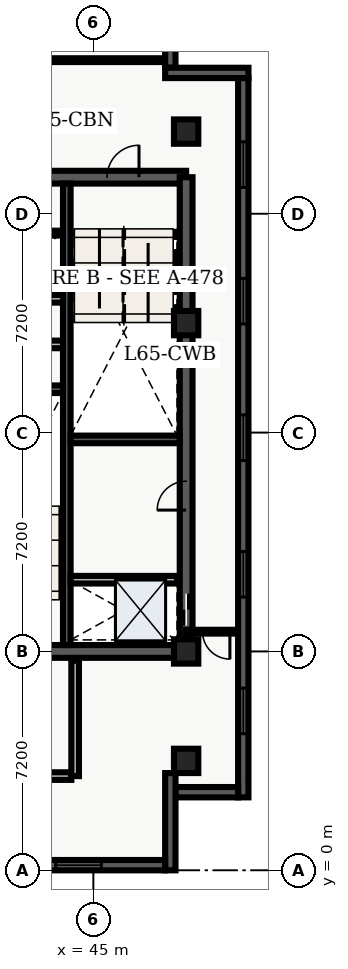
"""IFC4 building model, lengths in metres.
Left out: names, types, materials, properties, quantities, classifications, styles, units other than length and angle.
Written with IfcOpenShell. Run it as: python <this file> out.ifc"""

import sys

from ifc_helpers import new_model, entity, si_unit, converted_unit, direction, frame, origin_with_axes, origin_2d_with_axis, place, context, subcontext, project, spatial, polyline, rectangle, outline, extrude, element, fill, save


model = new_model("IFC4")
c1 = context("Model", 3, precision=1e-05, world=origin_with_axes(), true_north=direction((0.0, 1.0)))
c2 = subcontext(c1, "Body", "Model", "MODEL_VIEW")
j1 = project(units=[si_unit("LENGTHUNIT", "METRE"), converted_unit("PLANEANGLEUNIT", "DEGREE", entity("IfcPlaneAngleMeasure", 0.017), si_unit("PLANEANGLEUNIT", "RADIAN"), dimensions=[0, 0, 0, 0, 0, 0, 0])], contexts=[c1])
p1 = place(None, origin_with_axes())
s1 = spatial("IfcSite", under=j1, at=p1, CompositionType="ELEMENT")
p2 = place(p1, origin_with_axes())
s2 = spatial("IfcBuilding", under=s1, at=p2, CompositionType="ELEMENT")
p3 = place(p2, frame((0.0, 0.0, 264.6), z_axis=(0.0, 0.0, 1.0), x_axis=(1.0, 0.0, 0.0)))
s3 = spatial("IfcBuildingStorey", under=s2, at=p3, CompositionType="ELEMENT", Elevation=264.6)
p4 = place(p3, frame((40.2, 7.2, 0.0), z_axis=(0.0, 0.0, 1.0), x_axis=(1.0, 0.0, 0.0)))
e1 = element("IfcWall", 1, at=p4, inside=s3, PredefinedType="SHEAR", context=c2, shape_type="SweptSolid", body=[
    extrude(outline(polyline([(0.0, -0.21), (7.85, -0.21), (7.85, 0.21), (0.0, 0.21), (0.0, -0.21)])), origin_with_axes(), (0.0, 0.0, 1.0), 3.66),
])
p5 = place(p4, frame((2.175, 0.0, 0.0), z_axis=(0.0, 0.0, 1.0), x_axis=(1.0, 0.0, 0.0)))
e2 = element("IfcOpeningElement", 2, at=p5, cuts=e1, PredefinedType="OPENING", context=c2, shape_type="SweptSolid", body=[
    extrude(rectangle(XDim=1.05, YDim=0.44, at=origin_2d_with_axis()), origin_with_axes(), (0.0, 0.0, 1.0), 2.15),
])
p6 = place(p3, frame((40.2, 22.8, 0.0), z_axis=(0.0, 0.0, 1.0), x_axis=(1.0, 0.0, 0.0)))
e3 = element("IfcWall", 3, at=p6, inside=s3, PredefinedType="SHEAR", context=c2, shape_type="SweptSolid", body=[
    extrude(outline(polyline([(0.0, -0.21), (7.85, -0.21), (7.85, 0.21), (0.0, 0.21), (0.0, -0.21)])), origin_with_axes(), (0.0, 0.0, 1.0), 3.66),
])
p7 = place(p6, frame((5.775, 0.0, 0.0), z_axis=(0.0, 0.0, 1.0), x_axis=(1.0, 0.0, 0.0)))
e4 = element("IfcOpeningElement", 4, at=p7, cuts=e3, PredefinedType="OPENING", context=c2, shape_type="SweptSolid", body=[
    extrude(rectangle(XDim=1.05, YDim=0.44, at=origin_2d_with_axis()), origin_with_axes(), (0.0, 0.0, 1.0), 2.15),
])
p8 = place(p6, frame((2.15, 0.0, 0.0), z_axis=(0.0, 0.0, 1.0), x_axis=(1.0, 0.0, 0.0)))
e5 = element("IfcOpeningElement", 5, at=p8, cuts=e3, PredefinedType="OPENING", context=c2, shape_type="SweptSolid", body=[
    extrude(rectangle(XDim=0.9, YDim=0.44, at=origin_2d_with_axis()), origin_with_axes(), (0.0, 0.0, 1.0), 2.15),
])
p9 = place(p3, frame((48.05, 7.2, 0.0), z_axis=(0.0, 0.0, 1.0), x_axis=(0.0, 1.0, 0.0)))
e6 = element("IfcWall", 6, at=p9, inside=s3, PredefinedType="SHEAR", context=c2, shape_type="SweptSolid", body=[
    extrude(outline(polyline([(0.0, -0.21), (15.6, -0.21), (15.6, 0.21), (0.0, 0.21), (0.0, -0.21)])), origin_with_axes(), (0.0, 0.0, 1.0), 3.66),
])
p10 = place(p9, frame((1.375, 0.0, 0.0), z_axis=(0.0, 0.0, 1.0), x_axis=(1.0, 0.0, 0.0)))
e7 = element("IfcOpeningElement", 7, at=p10, cuts=e6, PredefinedType="OPENING", context=c2, shape_type="SweptSolid", body=[
    extrude(rectangle(XDim=1.05, YDim=0.44, at=origin_2d_with_axis()), origin_with_axes(), (0.0, 0.0, 1.0), 2.15),
])
p11 = place(p9, frame((5.125, 0.0, 0.0), z_axis=(0.0, 0.0, 1.0), x_axis=(1.0, 0.0, 0.0)))
e8 = element("IfcOpeningElement", 8, at=p11, cuts=e6, PredefinedType="OPENING", context=c2, shape_type="SweptSolid", body=[
    extrude(rectangle(XDim=0.95, YDim=0.44, at=origin_2d_with_axis()), origin_with_axes(), (0.0, 0.0, 1.0), 2.15),
])
p12 = place(p3, frame((44.125, 7.41, 0.0), z_axis=(0.0, 0.0, 1.0), x_axis=(0.0, 1.0, 0.0)))
e9 = element("IfcWall", 9, at=p12, inside=s3, PredefinedType="SHEAR", context=c2, shape_type="SweptSolid", body=[
    extrude(outline(polyline([(0.0, -0.125), (15.18, -0.125), (15.18, 0.125), (0.0, 0.125), (0.0, -0.125)])), origin_with_axes(), (0.0, 0.0, 1.0), 3.66),
])
for number, where, z_axis, x_axis in (
    (10, (40.41, 15.825, 0.0), (0.0, 0.0, 1.0), (1.0, 0.0, 0.0)),
    (11, (44.25, 14.175, 0.0), (0.0, 0.0, 1.0), (1.0, 0.0, 0.0)),
):
    element("IfcWall", number, at=place(p3, frame(where, z_axis=z_axis, x_axis=x_axis)), inside=s3, PredefinedType="SHEAR", context=c2, shape_type="SweptSolid", body=[
        extrude(outline(polyline([(0.0, -0.125), (3.59, -0.125), (3.59, 0.125), (0.0, 0.125), (0.0, -0.125)])), origin_with_axes(), (0.0, 0.0, 1.0), 3.66),
    ])
p13 = place(p3, frame((40.5, 17.3, 0.0), z_axis=(0.0, 0.0, 1.0), x_axis=(1.0, 0.0, 0.0)))
e12 = element("IfcWall", 12, at=p13, inside=s3, PredefinedType="SOLIDWALL", context=c2, shape_type="SweptSolid", body=[
    extrude(outline(polyline([(0.0, -0.125), (3.5, -0.125), (3.5, 0.125), (0.0, 0.125), (0.0, -0.125)])), origin_with_axes(), (0.0, 0.0, 1.0), 2.7),
])
p14 = place(p13, frame((2.4, 0.0, 0.0), z_axis=(0.0, 0.0, 1.0), x_axis=(1.0, 0.0, 0.0)))
e13 = element("IfcOpeningElement", 13, at=p14, cuts=e12, PredefinedType="OPENING", context=c2, shape_type="SweptSolid", body=[
    extrude(rectangle(XDim=0.9, YDim=0.27, at=origin_2d_with_axis()), origin_with_axes(), (0.0, 0.0, 1.0), 2.15),
])
p15 = place(p3, frame((40.5, 18.8, 0.0), z_axis=(0.0, 0.0, 1.0), x_axis=(1.0, 0.0, 0.0)))
e14 = element("IfcWall", 14, at=p15, inside=s3, PredefinedType="SOLIDWALL", context=c2, shape_type="SweptSolid", body=[
    extrude(outline(polyline([(0.0, -0.125), (3.5, -0.125), (3.5, 0.125), (0.0, 0.125), (0.0, -0.125)])), origin_with_axes(), (0.0, 0.0, 1.0), 2.7),
])
p16 = place(p3, frame((40.325, 3.1, 0.0), z_axis=(0.0, 0.0, 1.0), x_axis=(1.0, 0.0, 0.0)))
e15 = element("IfcWall", 15, at=p16, inside=s3, PredefinedType="SOLIDWALL", context=c2, shape_type="SweptSolid", body=[
    extrude(outline(polyline([(0.0, -0.125), (3.95, -0.125), (3.95, 0.125), (0.0, 0.125), (0.0, -0.125)])), origin_with_axes(), (0.0, 0.0, 1.0), 2.7),
])
p17 = place(p3, frame((44.4, 3.1, 0.0), z_axis=(0.0, 0.0, 1.0), x_axis=(0.0, 1.0, 0.0)))
e16 = element("IfcWall", 16, at=p17, inside=s3, PredefinedType="SOLIDWALL", context=c2, shape_type="SweptSolid", body=[
    extrude(outline(polyline([(0.0, -0.125), (3.8, -0.125), (3.8, 0.125), (0.0, 0.125), (0.0, -0.125)])), origin_with_axes(), (0.0, 0.0, 1.0), 2.7),
])
for number, where, z_axis, x_axis in (
    (17, (48.05, 3.6, 0.0), (0.0, 0.0, 1.0), (1.0, 0.0, 0.0)),
    (18, (48.05, 7.2, 0.0), (0.0, 0.0, 1.0), (1.0, 0.0, 0.0)),
    (19, (48.05, 18.0, 0.0), (0.0, 0.0, 1.0), (1.0, 0.0, 0.0)),
    (20, (48.05, 24.3, 0.0), (0.0, 0.0, 1.0), (1.0, 0.0, 0.0)),
):
    element("IfcColumn", number, at=place(p3, frame(where, z_axis=z_axis, x_axis=x_axis)), inside=s3, PredefinedType="COLUMN", context=c2, shape_type="SweptSolid", body=[
        extrude(rectangle(XDim=0.8, YDim=0.8, at=origin_2d_with_axis()), origin_with_axes(), (0.0, 0.0, 1.0), 3.9),
    ])
p18 = place(p3, frame((40.5, 20.96, 0.0), z_axis=(0.0, 0.0, 1.0), x_axis=(1.0, 0.0, 0.0)))
e21 = element("IfcWall", 21, at=p18, inside=s3, PredefinedType="PARTITIONING", context=c2, shape_type="SweptSolid", body=[
    extrude(outline(polyline([(0.0, -0.08), (3.5, -0.08), (3.5, 0.08), (0.0, 0.08), (0.0, -0.08)])), origin_with_axes(), (0.0, 0.0, 1.0), 2.7),
])
p19 = place(p3, frame((44.25, 9.56, 0.0), z_axis=(0.0, 0.0, 1.0), x_axis=(1.0, 0.0, 0.0)))
e22 = element("IfcWall", 22, at=p19, inside=s3, PredefinedType="SOLIDWALL", context=c2, shape_type="SweptSolid", body=[
    extrude(outline(polyline([(0.0, -0.125), (3.5, -0.125), (3.5, 0.125), (0.0, 0.125), (0.0, -0.125)])), origin_with_axes(), (0.0, 0.0, 1.0), 2.7),
])
p20 = place(p3, frame((49.765, 7.85, 0.0), z_axis=(0.0, 0.0, 1.0), x_axis=(-1.0, 0.0, 0.0)))
e23 = element("IfcWall", 23, at=p20, inside=s3, PredefinedType="PARTITIONING", context=c2, shape_type="SweptSolid", body=[
    extrude(outline(polyline([(0.0, -0.062), (1.715, -0.062), (1.715, 0.062), (0.0, 0.062), (0.0, -0.062)])), origin_with_axes(), (0.0, 0.0, 1.0), 2.7),
])
p21 = place(p20, frame((0.725, 0.0, 0.0), z_axis=(0.0, 0.0, 1.0), x_axis=(1.0, 0.0, 0.0)))
e24 = element("IfcOpeningElement", 24, at=p21, cuts=e23, PredefinedType="OPENING", context=c2, shape_type="SweptSolid", body=[
    extrude(rectangle(XDim=0.9, YDim=0.145, at=origin_2d_with_axis()), origin_with_axes(), (0.0, 0.0, 1.0), 2.15),
])
p22 = place(p3, frame((34.535, 26.65, 0.0), z_axis=(0.0, 0.0, 1.0), x_axis=(1.0, 0.0, 0.0)))
e25 = element("IfcWall", 25, at=p22, inside=s3, PredefinedType="PARTITIONING", context=c2, shape_type="SweptSolid", body=[
    extrude(outline(polyline([(0.0, -0.062), (12.995, -0.062), (12.995, 0.062), (0.0, 0.062), (0.0, -0.062)])), origin_with_axes(), (0.0, 0.0, 1.0), 2.7),
])
p23 = place(p22, frame((8.465, 0.0, 0.0), z_axis=(0.0, 0.0, 1.0), x_axis=(1.0, 0.0, 0.0)))
e26 = element("IfcOpeningElement", 26, at=p23, cuts=e25, PredefinedType="OPENING", context=c2, shape_type="SweptSolid", body=[
    extrude(rectangle(XDim=1.0, YDim=0.145, at=origin_2d_with_axis()), origin_with_axes(), (0.0, 0.0, 1.0), 2.15),
])
p24 = place(p3, frame((47.53, 28.46, 0.0), z_axis=(0.0, 0.0, 1.0), x_axis=(0.0, -1.0, 0.0)))
e27 = element("IfcWall", 27, at=p24, inside=s3, PredefinedType="SOLIDWALL", context=c2, shape_type="SweptSolid", body=[
    extrude(outline(polyline([(0.0, -0.17), (2.06, -0.17), (2.06, 0.17), (0.0, 0.17), (0.0, -0.17)])), origin_with_axes(), (0.0, 0.0, 1.0), 3.66),
])
p25 = place(p3, frame((47.36, 26.23, 0.0), z_axis=(0.0, 0.0, 1.0), x_axis=(1.0, 0.0, 0.0)))
e28 = element("IfcWall", 28, at=p25, inside=s3, PredefinedType="SOLIDWALL", context=c2, shape_type="SweptSolid", body=[
    extrude(outline(polyline([(0.0, -0.17), (2.74, -0.17), (2.74, 0.17), (0.0, 0.17), (0.0, -0.17)])), origin_with_axes(), (0.0, 0.0, 1.0), 3.66),
])
p26 = place(p3, frame((49.93, 26.06, 0.0), z_axis=(0.0, 0.0, 1.0), x_axis=(0.0, -1.0, 0.0)))
e29 = element("IfcWall", 29, at=p26, inside=s3, PredefinedType="SOLIDWALL", context=c2, shape_type="SweptSolid", body=[
    extrude(outline(polyline([(0.0, -0.17), (23.66, -0.17), (23.66, 0.17), (0.0, 0.17), (0.0, -0.17)])), origin_with_axes(), (0.0, 0.0, 1.0), 3.66),
])
p27 = place(p26, frame((2.846, 0.0, 0.45), z_axis=(0.0, 0.0, 1.0), x_axis=(1.0, 0.0, 0.0)))
e30 = element("IfcOpeningElement", 30, at=p27, cuts=e29, PredefinedType="OPENING", context=c2, shape_type="SweptSolid", body=[
    extrude(rectangle(XDim=1.5, YDim=0.36, at=origin_2d_with_axis()), origin_with_axes(), (0.0, 0.0, 1.0), 2.1),
])
p28 = place(p26, frame((7.338, 0.0, 0.45), z_axis=(0.0, 0.0, 1.0), x_axis=(1.0, 0.0, 0.0)))
e31 = element("IfcOpeningElement", 31, at=p28, cuts=e29, PredefinedType="OPENING", context=c2, shape_type="SweptSolid", body=[
    extrude(rectangle(XDim=1.5, YDim=0.36, at=origin_2d_with_axis()), origin_with_axes(), (0.0, 0.0, 1.0), 2.1),
])
p29 = place(p26, frame((11.83, 0.0, 0.45), z_axis=(0.0, 0.0, 1.0), x_axis=(1.0, 0.0, 0.0)))
e32 = element("IfcOpeningElement", 32, at=p29, cuts=e29, PredefinedType="OPENING", context=c2, shape_type="SweptSolid", body=[
    extrude(rectangle(XDim=1.5, YDim=0.36, at=origin_2d_with_axis()), origin_with_axes(), (0.0, 0.0, 1.0), 2.1),
])
p30 = place(p26, frame((16.322, 0.0, 0.45), z_axis=(0.0, 0.0, 1.0), x_axis=(1.0, 0.0, 0.0)))
e33 = element("IfcOpeningElement", 33, at=p30, cuts=e29, PredefinedType="OPENING", context=c2, shape_type="SweptSolid", body=[
    extrude(rectangle(XDim=1.5, YDim=0.36, at=origin_2d_with_axis()), origin_with_axes(), (0.0, 0.0, 1.0), 2.1),
])
p31 = place(p26, frame((20.814, 0.0, 0.45), z_axis=(0.0, 0.0, 1.0), x_axis=(1.0, 0.0, 0.0)))
e34 = element("IfcOpeningElement", 34, at=p31, cuts=e29, PredefinedType="OPENING", context=c2, shape_type="SweptSolid", body=[
    extrude(rectangle(XDim=1.5, YDim=0.36, at=origin_2d_with_axis()), origin_with_axes(), (0.0, 0.0, 1.0), 2.1),
])
p32 = place(p3, frame((49.76, 2.57, 0.0), z_axis=(0.0, 0.0, 1.0), x_axis=(-1.0, 0.0, 0.0)))
e35 = element("IfcWall", 35, at=p32, inside=s3, PredefinedType="SOLIDWALL", context=c2, shape_type="SweptSolid", body=[
    extrude(outline(polyline([(0.0, -0.17), (2.06, -0.17), (2.06, 0.17), (0.0, 0.17), (0.0, -0.17)])), origin_with_axes(), (0.0, 0.0, 1.0), 3.66),
])
p33 = place(p3, frame((47.53, 3.2, 0.0), z_axis=(0.0, 0.0, 1.0), x_axis=(0.0, -1.0, 0.0)))
e36 = element("IfcWall", 36, at=p33, inside=s3, PredefinedType="SOLIDWALL", context=c2, shape_type="SweptSolid", body=[
    extrude(outline(polyline([(0.0, -0.17), (3.2, -0.17), (3.2, 0.17), (0.0, 0.17), (0.0, -0.17)])), origin_with_axes(), (0.0, 0.0, 1.0), 3.66),
])
p34 = place(p3, frame((47.36, 0.17, 0.0), z_axis=(0.0, 0.0, 1.0), x_axis=(-1.0, 0.0, 0.0)))
e37 = element("IfcWall", 37, at=p34, inside=s3, PredefinedType="SOLIDWALL", context=c2, shape_type="SweptSolid", body=[
    extrude(outline(polyline([(0.0, -0.17), (37.16, -0.17), (37.16, 0.17), (0.0, 0.17), (0.0, -0.17)])), origin_with_axes(), (0.0, 0.0, 1.0), 3.66),
])
p35 = place(p34, frame((2.847, 0.0, 0.45), z_axis=(0.0, 0.0, 1.0), x_axis=(1.0, 0.0, 0.0)))
e38 = element("IfcOpeningElement", 38, at=p35, cuts=e37, PredefinedType="OPENING", context=c2, shape_type="SweptSolid", body=[
    extrude(rectangle(XDim=1.5, YDim=0.36, at=origin_2d_with_axis()), origin_with_axes(), (0.0, 0.0, 1.0), 2.1),
])
p36 = place(p34, frame((7.342, 0.0, 0.45), z_axis=(0.0, 0.0, 1.0), x_axis=(1.0, 0.0, 0.0)))
e39 = element("IfcOpeningElement", 39, at=p36, cuts=e37, PredefinedType="OPENING", context=c2, shape_type="SweptSolid", body=[
    extrude(rectangle(XDim=1.5, YDim=0.36, at=origin_2d_with_axis()), origin_with_axes(), (0.0, 0.0, 1.0), 2.1),
])
p37 = place(p34, frame((11.837, 0.0, 0.45), z_axis=(0.0, 0.0, 1.0), x_axis=(1.0, 0.0, 0.0)))
e40 = element("IfcOpeningElement", 40, at=p37, cuts=e37, PredefinedType="OPENING", context=c2, shape_type="SweptSolid", body=[
    extrude(rectangle(XDim=1.5, YDim=0.36, at=origin_2d_with_axis()), origin_with_axes(), (0.0, 0.0, 1.0), 2.1),
])
p38 = place(p34, frame((16.332, 0.0, 0.45), z_axis=(0.0, 0.0, 1.0), x_axis=(1.0, 0.0, 0.0)))
e41 = element("IfcOpeningElement", 41, at=p38, cuts=e37, PredefinedType="OPENING", context=c2, shape_type="SweptSolid", body=[
    extrude(rectangle(XDim=1.5, YDim=0.36, at=origin_2d_with_axis()), origin_with_axes(), (0.0, 0.0, 1.0), 2.1),
])
p39 = place(p34, frame((20.827, 0.0, 0.45), z_axis=(0.0, 0.0, 1.0), x_axis=(1.0, 0.0, 0.0)))
e42 = element("IfcOpeningElement", 42, at=p39, cuts=e37, PredefinedType="OPENING", context=c2, shape_type="SweptSolid", body=[
    extrude(rectangle(XDim=1.5, YDim=0.36, at=origin_2d_with_axis()), origin_with_axes(), (0.0, 0.0, 1.0), 2.1),
])
p40 = place(p34, frame((25.322, 0.0, 0.45), z_axis=(0.0, 0.0, 1.0), x_axis=(1.0, 0.0, 0.0)))
e43 = element("IfcOpeningElement", 43, at=p40, cuts=e37, PredefinedType="OPENING", context=c2, shape_type="SweptSolid", body=[
    extrude(rectangle(XDim=1.5, YDim=0.36, at=origin_2d_with_axis()), origin_with_axes(), (0.0, 0.0, 1.0), 2.1),
])
p41 = place(p34, frame((29.817, 0.0, 0.45), z_axis=(0.0, 0.0, 1.0), x_axis=(1.0, 0.0, 0.0)))
e44 = element("IfcOpeningElement", 44, at=p41, cuts=e37, PredefinedType="OPENING", context=c2, shape_type="SweptSolid", body=[
    extrude(rectangle(XDim=1.5, YDim=0.36, at=origin_2d_with_axis()), origin_with_axes(), (0.0, 0.0, 1.0), 2.1),
])
p42 = place(p34, frame((34.312, 0.0, 0.45), z_axis=(0.0, 0.0, 1.0), x_axis=(1.0, 0.0, 0.0)))
e45 = element("IfcOpeningElement", 45, at=p42, cuts=e37, PredefinedType="OPENING", context=c2, shape_type="SweptSolid", body=[
    extrude(rectangle(XDim=1.5, YDim=0.36, at=origin_2d_with_axis()), origin_with_axes(), (0.0, 0.0, 1.0), 2.1),
])
p43 = place(p9, frame((1.375, 0.0, 0.0), z_axis=(0.0, 0.0, 1.0), x_axis=(1.0, 0.0, 0.0)))
e46 = element("IfcDoor", 46, at=p43, inside=s3, OperationType="SLIDING_TO_LEFT", PredefinedType="DOOR", context=c2, shape_type="SweptSolid", body=[
    extrude(rectangle(XDim=1.05, YDim=0.09, at=origin_2d_with_axis()), origin_with_axes(), (0.0, 0.0, 1.0), 2.15),
])
fill(e7, e46)
p44 = place(p6, frame((5.775, 0.0, 0.0), z_axis=(0.0, 0.0, 1.0), x_axis=(1.0, 0.0, 0.0)))
e47 = element("IfcDoor", 47, at=p44, inside=s3, OperationType="SINGLE_SWING_RIGHT", PredefinedType="DOOR", context=c2, shape_type="SweptSolid", body=[
    extrude(rectangle(XDim=1.05, YDim=0.09, at=origin_2d_with_axis()), origin_with_axes(), (0.0, 0.0, 1.0), 2.15),
])
fill(e4, e47)
p45 = place(p9, frame((5.125, 0.0, 0.0), z_axis=(0.0, 0.0, 1.0), x_axis=(1.0, 0.0, 0.0)))
e48 = element("IfcDoor", 48, at=p45, inside=s3, OperationType="SINGLE_SWING_LEFT", PredefinedType="DOOR", context=c2, shape_type="SweptSolid", body=[
    extrude(rectangle(XDim=0.95, YDim=0.09, at=origin_2d_with_axis()), origin_with_axes(), (0.0, 0.0, 1.0), 2.15),
])
fill(e8, e48)
p46 = place(p20, frame((0.725, 0.0, 0.0), z_axis=(0.0, 0.0, 1.0), x_axis=(1.0, 0.0, 0.0)))
e49 = element("IfcDoor", 49, at=p46, inside=s3, OperationType="SINGLE_SWING_LEFT", PredefinedType="DOOR", context=c2, shape_type="SweptSolid", body=[
    extrude(rectangle(XDim=0.9, YDim=0.075, at=origin_2d_with_axis()), origin_with_axes(), (0.0, 0.0, 1.0), 2.15),
])
fill(e24, e49)
p47 = place(p26, frame((2.846, 0.0, 0.45), z_axis=(0.0, 0.0, 1.0), x_axis=(1.0, 0.0, 0.0)))
e50 = element("IfcWindow", 50, at=p47, inside=s3, PredefinedType="WINDOW", context=c2, shape_type="SweptSolid", body=[
    extrude(rectangle(XDim=1.5, YDim=0.09, at=origin_2d_with_axis()), origin_with_axes(), (0.0, 0.0, 1.0), 2.1),
])
fill(e30, e50)
p48 = place(p26, frame((7.338, 0.0, 0.45), z_axis=(0.0, 0.0, 1.0), x_axis=(1.0, 0.0, 0.0)))
e51 = element("IfcWindow", 51, at=p48, inside=s3, PredefinedType="WINDOW", context=c2, shape_type="SweptSolid", body=[
    extrude(rectangle(XDim=1.5, YDim=0.09, at=origin_2d_with_axis()), origin_with_axes(), (0.0, 0.0, 1.0), 2.1),
])
fill(e31, e51)
p49 = place(p26, frame((11.83, 0.0, 0.45), z_axis=(0.0, 0.0, 1.0), x_axis=(1.0, 0.0, 0.0)))
e52 = element("IfcWindow", 52, at=p49, inside=s3, PredefinedType="WINDOW", context=c2, shape_type="SweptSolid", body=[
    extrude(rectangle(XDim=1.5, YDim=0.09, at=origin_2d_with_axis()), origin_with_axes(), (0.0, 0.0, 1.0), 2.1),
])
fill(e32, e52)
p50 = place(p26, frame((16.322, 0.0, 0.45), z_axis=(0.0, 0.0, 1.0), x_axis=(1.0, 0.0, 0.0)))
e53 = element("IfcWindow", 53, at=p50, inside=s3, PredefinedType="WINDOW", context=c2, shape_type="SweptSolid", body=[
    extrude(rectangle(XDim=1.5, YDim=0.09, at=origin_2d_with_axis()), origin_with_axes(), (0.0, 0.0, 1.0), 2.1),
])
fill(e33, e53)
p51 = place(p26, frame((20.814, 0.0, 0.45), z_axis=(0.0, 0.0, 1.0), x_axis=(1.0, 0.0, 0.0)))
e54 = element("IfcWindow", 54, at=p51, inside=s3, PredefinedType="WINDOW", context=c2, shape_type="SweptSolid", body=[
    extrude(rectangle(XDim=1.5, YDim=0.09, at=origin_2d_with_axis()), origin_with_axes(), (0.0, 0.0, 1.0), 2.1),
])
fill(e34, e54)
p52 = place(p34, frame((2.847, 0.0, 0.45), z_axis=(0.0, 0.0, 1.0), x_axis=(1.0, 0.0, 0.0)))
e55 = element("IfcWindow", 55, at=p52, inside=s3, PredefinedType="WINDOW", context=c2, shape_type="SweptSolid", body=[
    extrude(rectangle(XDim=1.5, YDim=0.09, at=origin_2d_with_axis()), origin_with_axes(), (0.0, 0.0, 1.0), 2.1),
])
fill(e38, e55)
save(model, sys.argv[1])
